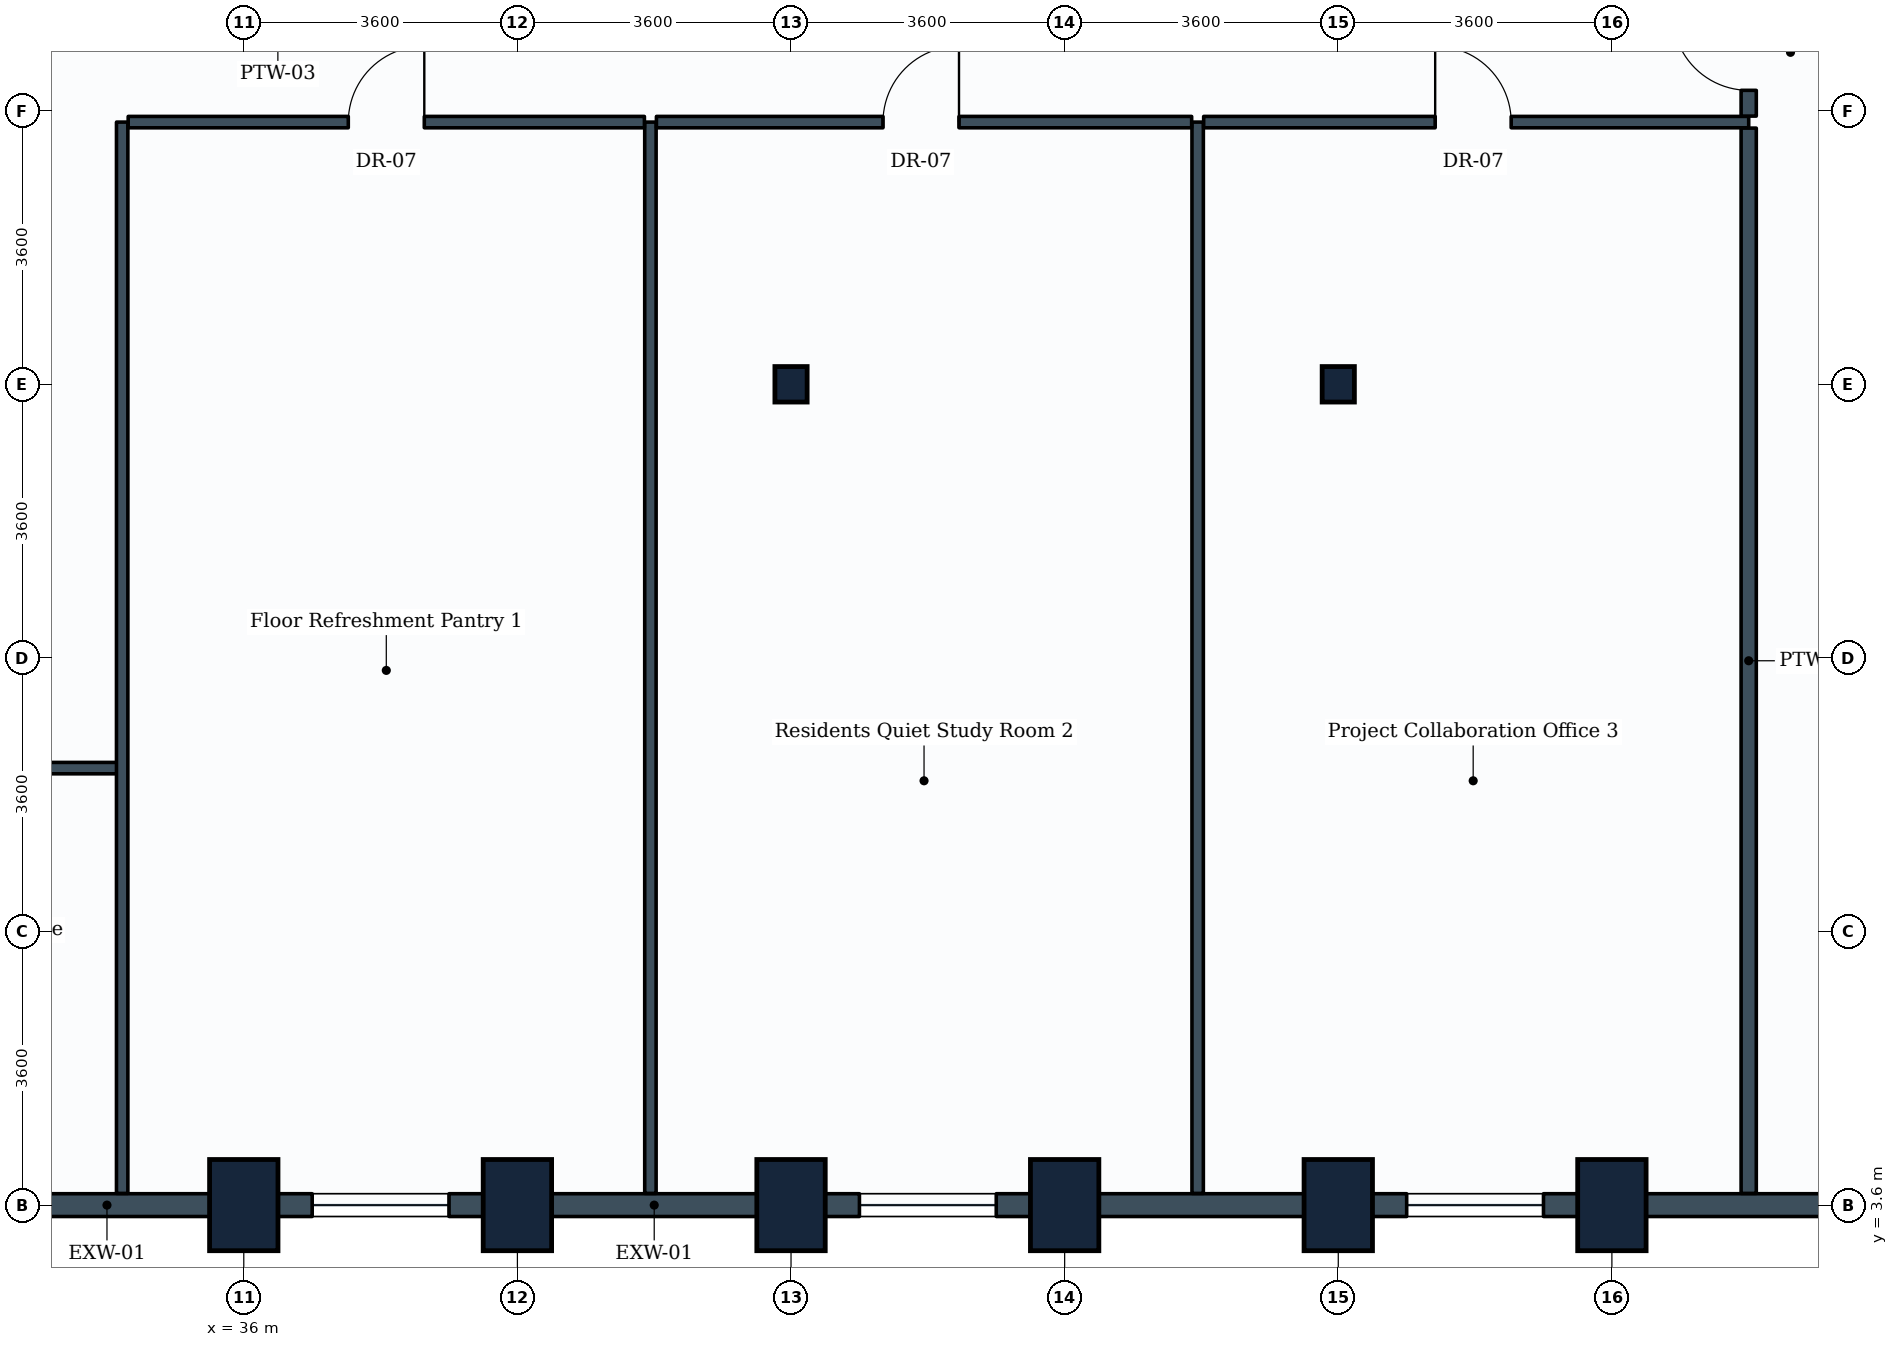
"""IFC4 building model, lengths in metres.
Left out: names, types, materials, properties, quantities, classifications, styles, units other than length and angle.
Written with IfcOpenShell. Run it as: python <this file> out.ifc"""

import sys

from ifc_helpers import new_model, si_unit, direction, frame, frame_2d, origin, origin_2d, place, context, subcontext, project, spatial, rectangle, i_section, extrude, element, fill, save


model = new_model("IFC4")
c1 = context("Model", 3, precision=1e-05, world=origin(), true_north=direction((0.0, 1.0)))
c2 = subcontext(c1, "Body", "Model", "MODEL_VIEW")
j1 = project(units=[si_unit("LENGTHUNIT", "METRE"), si_unit("PLANEANGLEUNIT", "RADIAN")], contexts=[c1])
p1 = place(None, origin())
s1 = spatial("IfcSite", under=j1, at=p1, CompositionType="ELEMENT")
p2 = place(p1, origin())
s2 = spatial("IfcBuilding", under=s1, at=p2, CompositionType="ELEMENT")
p3 = place(p2, frame((0.0, 0.0, 55.2)))
s3 = spatial("IfcBuildingStorey", under=s2, at=p3, CompositionType="ELEMENT", Elevation=55.2)
for number, where, z_axis, x_axis in (
    (1, (36.0, 3.6, 0.0), (0.0, 0.0, 1.0), (1.0, 0.0, 0.0)),
    (2, (39.6, 3.6, 0.0), (0.0, 0.0, 1.0), (1.0, 0.0, 0.0)),
    (3, (43.2, 3.6, 0.0), (0.0, 0.0, 1.0), (1.0, 0.0, 0.0)),
):
    element("IfcColumn", number, at=place(p3, frame(where, z_axis=z_axis, x_axis=x_axis)), inside=s3, PredefinedType="COLUMN", context=c2, shape_type="SweptSolid", body=[
        extrude(rectangle(XDim=0.9, YDim=1.2, at=origin_2d()), origin(), (0.0, 0.0, 1.0), 3.9),
    ])
p4 = place(p3, frame((43.2, 14.4, 0.0), z_axis=(0.0, 0.0, 1.0), x_axis=(1.0, 0.0, 0.0)))
e4 = element("IfcColumn", 4, at=p4, inside=s3, PredefinedType="COLUMN", context=c2, shape_type="SweptSolid", body=[
    extrude(i_section(OverallWidth=0.424, OverallDepth=0.467, WebThickness=0.033, FlangeThickness=0.053, FilletRadius=0.015, at=origin_2d()), origin(), (0.0, 0.0, 1.0), 3.9),
])
for number, where, z_axis, x_axis in (
    (5, (46.8, 3.6, 0.0), (0.0, 0.0, 1.0), (1.0, 0.0, 0.0)),
    (6, (50.4, 3.6, 0.0), (0.0, 0.0, 1.0), (1.0, 0.0, 0.0)),
):
    element("IfcColumn", number, at=place(p3, frame(where, z_axis=z_axis, x_axis=x_axis)), inside=s3, PredefinedType="COLUMN", context=c2, shape_type="SweptSolid", body=[
        extrude(rectangle(XDim=0.9, YDim=1.2, at=origin_2d()), origin(), (0.0, 0.0, 1.0), 3.9),
    ])
p5 = place(p3, frame((50.4, 14.4, 0.0), z_axis=(0.0, 0.0, 1.0), x_axis=(1.0, 0.0, 0.0)))
e7 = element("IfcColumn", 7, at=p5, inside=s3, PredefinedType="COLUMN", context=c2, shape_type="SweptSolid", body=[
    extrude(i_section(OverallWidth=0.424, OverallDepth=0.467, WebThickness=0.033, FlangeThickness=0.053, FilletRadius=0.015, at=origin_2d()), origin(), (0.0, 0.0, 1.0), 3.9),
])
p6 = place(p3, frame((54.0, 3.6, 0.0), z_axis=(0.0, 0.0, 1.0), x_axis=(1.0, 0.0, 0.0)))
e8 = element("IfcColumn", 8, at=p6, inside=s3, PredefinedType="COLUMN", context=c2, shape_type="SweptSolid", body=[
    extrude(rectangle(XDim=0.9, YDim=1.2, at=origin_2d()), origin(), (0.0, 0.0, 1.0), 3.9),
])
p7 = place(p3, frame((36.0, 3.6, 0.0), z_axis=(0.0, 0.0, 1.0), x_axis=(-1.0, 0.0, 0.0)))
e9 = element("IfcWall", 9, at=p7, inside=s3, PredefinedType="STANDARD", context=c2, shape_type="SweptSolid", body=[
    extrude(rectangle(XDim=3.6, YDim=0.3, at=frame_2d((1.8, 0.0))), origin(), (0.0, 0.0, 1.0), 2.93),
])
p8 = place(p3, frame((39.6, 3.6, 0.0), z_axis=(0.0, 0.0, 1.0), x_axis=(-1.0, 0.0, 0.0)))
e10 = element("IfcWall", 10, at=p8, inside=s3, PredefinedType="STANDARD", context=c2, shape_type="SweptSolid", body=[
    extrude(rectangle(XDim=3.6, YDim=0.3, at=frame_2d((1.8, 0.0))), origin(), (0.0, 0.0, 1.0), 2.93),
])
p9 = place(p8, frame((0.9, 0.0, 0.85)))
e11 = element("IfcOpeningElement", 11, at=p9, cuts=e10, PredefinedType="OPENING", context=c2, shape_type="SweptSolid", body=[
    extrude(rectangle(XDim=1.8, YDim=1.35, at=frame_2d((0.9, 0.675))), frame((0.0, 0.16, 0.0), z_axis=(0.0, -1.0, 0.0), x_axis=(1.0, 0.0, 0.0)), (0.0, 0.0, 1.0), 0.32),
])
p10 = place(p3, frame((43.2, 3.6, 0.0), z_axis=(0.0, 0.0, 1.0), x_axis=(-1.0, 0.0, 0.0)))
e12 = element("IfcWall", 12, at=p10, inside=s3, PredefinedType="STANDARD", context=c2, shape_type="SweptSolid", body=[
    extrude(rectangle(XDim=3.6, YDim=0.3, at=frame_2d((1.8, 0.0))), origin(), (0.0, 0.0, 1.0), 2.93),
])
p11 = place(p3, frame((46.8, 3.6, 0.0), z_axis=(0.0, 0.0, 1.0), x_axis=(-1.0, 0.0, 0.0)))
e13 = element("IfcWall", 13, at=p11, inside=s3, PredefinedType="STANDARD", context=c2, shape_type="SweptSolid", body=[
    extrude(rectangle(XDim=3.6, YDim=0.3, at=frame_2d((1.8, 0.0))), origin(), (0.0, 0.0, 1.0), 2.93),
])
p12 = place(p11, frame((0.9, 0.0, 0.85)))
e14 = element("IfcOpeningElement", 14, at=p12, cuts=e13, PredefinedType="OPENING", context=c2, shape_type="SweptSolid", body=[
    extrude(rectangle(XDim=1.8, YDim=1.35, at=frame_2d((0.9, 0.675))), frame((0.0, 0.16, 0.0), z_axis=(0.0, -1.0, 0.0), x_axis=(1.0, 0.0, 0.0)), (0.0, 0.0, 1.0), 0.32),
])
p13 = place(p3, frame((50.4, 3.6, 0.0), z_axis=(0.0, 0.0, 1.0), x_axis=(-1.0, 0.0, 0.0)))
e15 = element("IfcWall", 15, at=p13, inside=s3, PredefinedType="STANDARD", context=c2, shape_type="SweptSolid", body=[
    extrude(rectangle(XDim=3.6, YDim=0.3, at=frame_2d((1.8, 0.0))), origin(), (0.0, 0.0, 1.0), 2.93),
])
p14 = place(p3, frame((54.0, 3.6, 0.0), z_axis=(0.0, 0.0, 1.0), x_axis=(-1.0, 0.0, 0.0)))
e16 = element("IfcWall", 16, at=p14, inside=s3, PredefinedType="STANDARD", context=c2, shape_type="SweptSolid", body=[
    extrude(rectangle(XDim=3.6, YDim=0.3, at=frame_2d((1.8, 0.0))), origin(), (0.0, 0.0, 1.0), 2.93),
])
p15 = place(p14, frame((0.9, 0.0, 0.85)))
e17 = element("IfcOpeningElement", 17, at=p15, cuts=e16, PredefinedType="OPENING", context=c2, shape_type="SweptSolid", body=[
    extrude(rectangle(XDim=1.8, YDim=1.35, at=frame_2d((0.9, 0.675))), frame((0.0, 0.16, 0.0), z_axis=(0.0, -1.0, 0.0), x_axis=(1.0, 0.0, 0.0)), (0.0, 0.0, 1.0), 0.32),
])
p16 = place(p3, frame((57.6, 3.6, 0.0), z_axis=(0.0, 0.0, 1.0), x_axis=(-1.0, 0.0, 0.0)))
e18 = element("IfcWall", 18, at=p16, inside=s3, PredefinedType="STANDARD", context=c2, shape_type="SweptSolid", body=[
    extrude(rectangle(XDim=3.6, YDim=0.3, at=frame_2d((1.8, 0.0))), origin(), (0.0, 0.0, 1.0), 2.93),
])
p17 = place(p3, frame((28.879, 9.35, 0.0), z_axis=(0.0, 0.0, 1.0), x_axis=(1.0, 0.0, 0.0)))
e19 = element("IfcWall", 19, at=p17, inside=s3, PredefinedType="PARTITIONING", context=c2, shape_type="SweptSolid", body=[
    extrude(rectangle(XDim=5.521, YDim=0.15, at=frame_2d((2.76, 0.0))), origin(), (0.0, 0.0, 1.0), 3.635),
])
p18 = place(p17, frame((0.36, 0.0, 0.0)))
e20 = element("IfcOpeningElement", 20, at=p18, cuts=e19, PredefinedType="OPENING", context=c2, shape_type="SweptSolid", body=[
    extrude(rectangle(XDim=1.0, YDim=2.1, at=frame_2d((0.5, 1.05))), frame((0.0, 0.085, 0.0), z_axis=(0.0, -1.0, 0.0), x_axis=(1.0, 0.0, 0.0)), (0.0, 0.0, 1.0), 0.17),
])
for number, where, z_axis, x_axis in (
    (21, (34.4, 3.754, 0.0), (0.0, 0.0, 1.0), (0.0, 1.0, 0.0)),
    (22, (41.35, 3.754, 0.0), (0.0, 0.0, 1.0), (0.0, 1.0, 0.0)),
):
    element("IfcWall", number, at=place(p3, frame(where, z_axis=z_axis, x_axis=x_axis)), inside=s3, PredefinedType="PARTITIONING", context=c2, shape_type="SweptSolid", body=[
        extrude(rectangle(XDim=14.096, YDim=0.15, at=frame_2d((7.048, 0.0))), origin(), (0.0, 0.0, 1.0), 2.93),
    ])
p19 = place(p3, frame((34.479, 17.85, 0.0), z_axis=(0.0, 0.0, 1.0), x_axis=(1.0, 0.0, 0.0)))
e23 = element("IfcWall", 23, at=p19, inside=s3, PredefinedType="PARTITIONING", context=c2, shape_type="SweptSolid", body=[
    extrude(rectangle(XDim=6.792, YDim=0.15, at=frame_2d((3.396, 0.0))), origin(), (0.0, 0.0, 1.0), 3.04),
])
p20 = place(p19, frame((2.896, 0.0, 0.0)))
e24 = element("IfcOpeningElement", 24, at=p20, cuts=e23, PredefinedType="OPENING", context=c2, shape_type="SweptSolid", body=[
    extrude(rectangle(XDim=1.0, YDim=2.1, at=frame_2d((0.5, 1.05))), frame((0.0, 0.085, 0.0), z_axis=(0.0, -1.0, 0.0), x_axis=(1.0, 0.0, 0.0)), (0.0, 0.0, 1.0), 0.17),
])
p21 = place(p3, frame((48.55, 3.754, 0.0), z_axis=(0.0, 0.0, 1.0), x_axis=(0.0, 1.0, 0.0)))
e25 = element("IfcWall", 25, at=p21, inside=s3, PredefinedType="PARTITIONING", context=c2, shape_type="SweptSolid", body=[
    extrude(rectangle(XDim=14.096, YDim=0.15, at=frame_2d((7.048, 0.0))), origin(), (0.0, 0.0, 1.0), 2.93),
])
p22 = place(p3, frame((41.429, 17.85, 0.0), z_axis=(0.0, 0.0, 1.0), x_axis=(1.0, 0.0, 0.0)))
e26 = element("IfcWall", 26, at=p22, inside=s3, PredefinedType="PARTITIONING", context=c2, shape_type="SweptSolid", body=[
    extrude(rectangle(XDim=7.042, YDim=0.15, at=frame_2d((3.521, 0.0))), origin(), (0.0, 0.0, 1.0), 3.03),
])
p23 = place(p22, frame((2.981, 0.0, 0.0)))
e27 = element("IfcOpeningElement", 27, at=p23, cuts=e26, PredefinedType="OPENING", context=c2, shape_type="SweptSolid", body=[
    extrude(rectangle(XDim=1.0, YDim=2.1, at=frame_2d((0.5, 1.05))), frame((0.0, 0.085, 0.0), z_axis=(0.0, -1.0, 0.0), x_axis=(1.0, 0.0, 0.0)), (0.0, 0.0, 1.0), 0.17),
])
p24 = place(p3, frame((48.629, 17.85, 0.0), z_axis=(0.0, 0.0, 1.0), x_axis=(1.0, 0.0, 0.0)))
e28 = element("IfcWall", 28, at=p24, inside=s3, PredefinedType="PARTITIONING", context=c2, shape_type="SweptSolid", body=[
    extrude(rectangle(XDim=7.171, YDim=0.15, at=frame_2d((3.585, 0.0))), origin(), (0.0, 0.0, 1.0), 3.04),
])
p25 = place(p24, frame((3.046, 0.0, 0.0)))
e29 = element("IfcOpeningElement", 29, at=p25, cuts=e28, PredefinedType="OPENING", context=c2, shape_type="SweptSolid", body=[
    extrude(rectangle(XDim=1.0, YDim=2.1, at=frame_2d((0.5, 1.05))), frame((0.0, 0.085, 0.0), z_axis=(0.0, -1.0, 0.0), x_axis=(1.0, 0.0, 0.0)), (0.0, 0.0, 1.0), 0.17),
])
p26 = place(p3, frame((55.8, 3.754, 0.0), z_axis=(0.0, 0.0, 1.0), x_axis=(0.0, 1.0, 0.0)))
e30 = element("IfcWall", 30, at=p26, inside=s3, PredefinedType="PARTITIONING", context=c2, shape_type="SweptSolid", body=[
    extrude(rectangle(XDim=14.017, YDim=0.2, at=frame_2d((7.009, 0.0))), origin(), (0.0, 0.0, 1.0), 2.93),
])
p27 = place(p3, frame((55.8, 17.929, 0.0), z_axis=(0.0, 0.0, 1.0), x_axis=(0.0, 1.0, 0.0)))
e31 = element("IfcWall", 31, at=p27, inside=s3, PredefinedType="PARTITIONING", context=c2, shape_type="SweptSolid", body=[
    extrude(rectangle(XDim=1.692, YDim=0.2, at=frame_2d((0.846, 0.0))), origin(), (0.0, 0.0, 1.0), 3.635),
])
p28 = place(p27, frame((0.339, 0.0, 0.0)))
e32 = element("IfcOpeningElement", 32, at=p28, cuts=e31, PredefinedType="OPENING", context=c2, shape_type="SweptSolid", body=[
    extrude(rectangle(XDim=1.0, YDim=2.1, at=frame_2d((0.5, 1.05))), frame((0.0, 0.11, 0.0), z_axis=(0.0, -1.0, 0.0), x_axis=(1.0, 0.0, 0.0)), (0.0, 0.0, 1.0), 0.22),
])
p29 = place(p9, origin())
e33 = element("IfcWindow", 33, at=p29, inside=s3, PartitioningType="SINGLE_PANEL", PredefinedType="WINDOW", context=c2, shape_type="SweptSolid", body=[
    extrude(rectangle(XDim=1.8, YDim=1.35, at=frame_2d((0.9, 0.675))), frame((0.0, 0.03, 0.0), z_axis=(0.0, -1.0, 0.0), x_axis=(1.0, 0.0, 0.0)), (0.0, 0.0, 1.0), 0.06),
])
fill(e11, e33)
p30 = place(p12, origin())
e34 = element("IfcWindow", 34, at=p30, inside=s3, PartitioningType="SINGLE_PANEL", PredefinedType="WINDOW", context=c2, shape_type="SweptSolid", body=[
    extrude(rectangle(XDim=1.8, YDim=1.35, at=frame_2d((0.9, 0.675))), frame((0.0, 0.03, 0.0), z_axis=(0.0, -1.0, 0.0), x_axis=(1.0, 0.0, 0.0)), (0.0, 0.0, 1.0), 0.06),
])
fill(e14, e34)
p31 = place(p15, origin())
e35 = element("IfcWindow", 35, at=p31, inside=s3, PartitioningType="SINGLE_PANEL", PredefinedType="WINDOW", context=c2, shape_type="SweptSolid", body=[
    extrude(rectangle(XDim=1.8, YDim=1.35, at=frame_2d((0.9, 0.675))), frame((0.0, 0.03, 0.0), z_axis=(0.0, -1.0, 0.0), x_axis=(1.0, 0.0, 0.0)), (0.0, 0.0, 1.0), 0.06),
])
fill(e17, e35)
p32 = place(p20, origin())
e36 = element("IfcDoor", 36, at=p32, inside=s3, OperationType="SINGLE_SWING_RIGHT", PredefinedType="DOOR", context=c2, shape_type="SweptSolid", body=[
    extrude(rectangle(XDim=1.0, YDim=2.1, at=frame_2d((0.5, 1.05))), frame((0.0, 0.025, 0.0), z_axis=(0.0, -1.0, 0.0), x_axis=(1.0, 0.0, 0.0)), (0.0, 0.0, 1.0), 0.05),
])
fill(e24, e36)
p33 = place(p23, origin())
e37 = element("IfcDoor", 37, at=p33, inside=s3, OperationType="SINGLE_SWING_RIGHT", PredefinedType="DOOR", context=c2, shape_type="SweptSolid", body=[
    extrude(rectangle(XDim=1.0, YDim=2.1, at=frame_2d((0.5, 1.05))), frame((0.0, 0.025, 0.0), z_axis=(0.0, -1.0, 0.0), x_axis=(1.0, 0.0, 0.0)), (0.0, 0.0, 1.0), 0.05),
])
fill(e27, e37)
p34 = place(p25, origin())
e38 = element("IfcDoor", 38, at=p34, inside=s3, OperationType="SINGLE_SWING_LEFT", PredefinedType="DOOR", context=c2, shape_type="SweptSolid", body=[
    extrude(rectangle(XDim=1.0, YDim=2.1, at=frame_2d((0.5, 1.05))), frame((0.0, 0.025, 0.0), z_axis=(0.0, -1.0, 0.0), x_axis=(1.0, 0.0, 0.0)), (0.0, 0.0, 1.0), 0.05),
])
fill(e29, e38)
p35 = place(p28, origin())
e39 = element("IfcDoor", 39, at=p35, inside=s3, OperationType="SINGLE_SWING_RIGHT", PredefinedType="DOOR", context=c2, shape_type="SweptSolid", body=[
    extrude(rectangle(XDim=1.0, YDim=2.1, at=frame_2d((0.5, 1.05))), frame((0.0, 0.025, 0.0), z_axis=(0.0, -1.0, 0.0), x_axis=(1.0, 0.0, 0.0)), (0.0, 0.0, 1.0), 0.05),
])
fill(e32, e39)
save(model, sys.argv[1])
